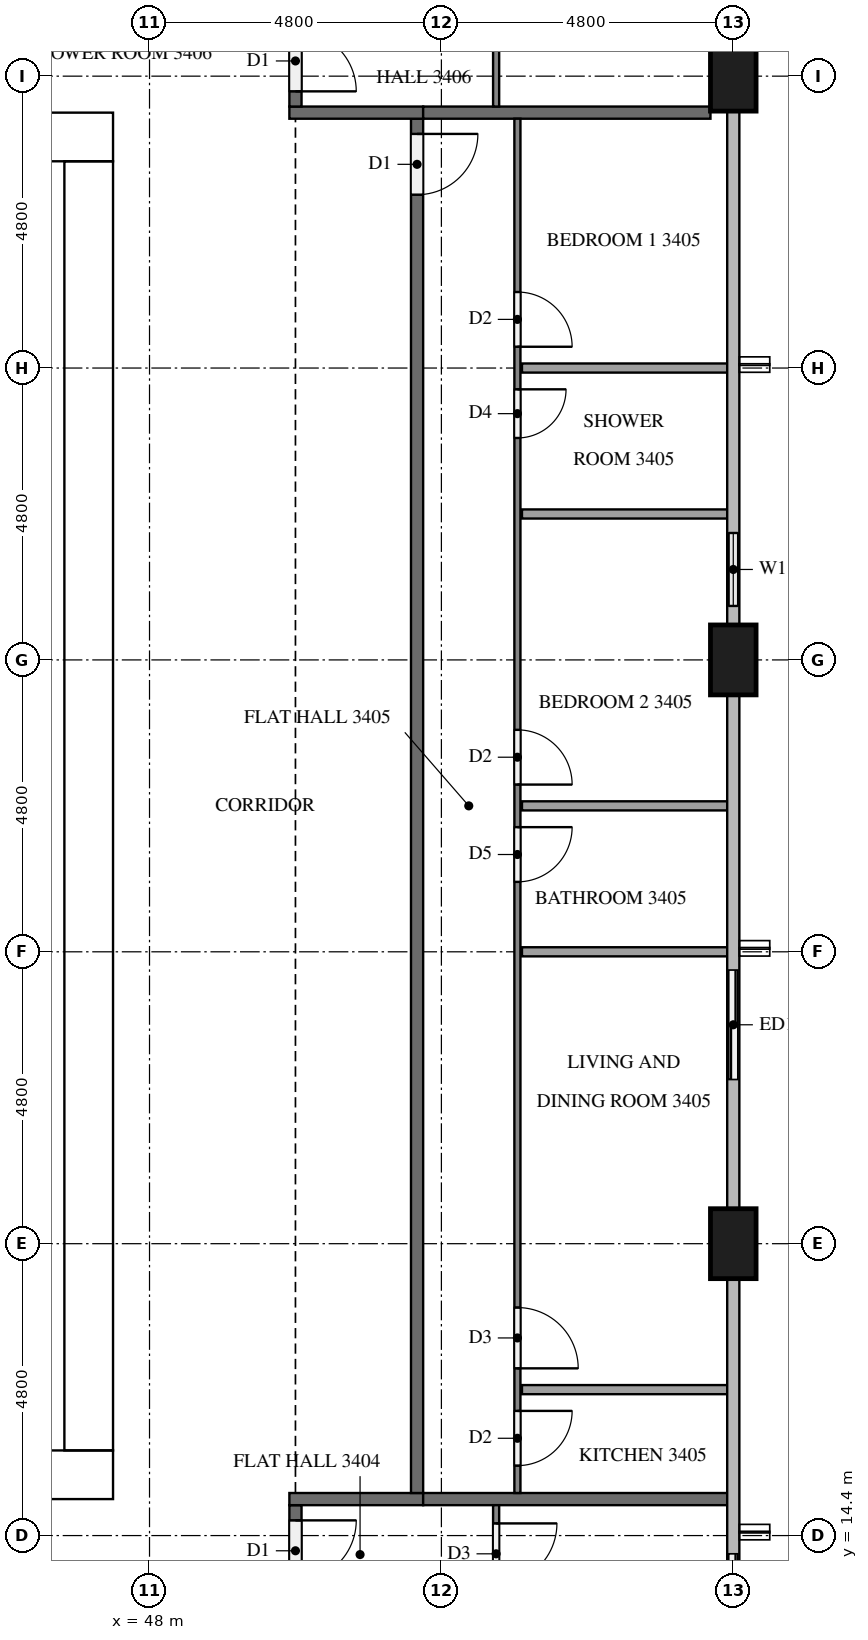
"""IFC4 building model, lengths in metres.
Left out: names, types, materials, properties, quantities, classifications, styles, units other than length and angle.
Written with IfcOpenShell. Run it as: python <this file> out.ifc"""

import sys

from ifc_helpers import new_model, si_unit, direction, frame, frame_2d, origin, origin_2d, place, context, subcontext, project, spatial, rectangle, extrude, element, fill, save


model = new_model("IFC4")
c1 = context("Model", 3, precision=1e-05, world=origin(), true_north=direction((0.0, 1.0)))
c2 = subcontext(c1, "Body", "Model", "MODEL_VIEW")
j1 = project(units=[si_unit("LENGTHUNIT", "METRE"), si_unit("PLANEANGLEUNIT", "RADIAN")], contexts=[c1])
p1 = place(None, origin())
s1 = spatial("IfcSite", under=j1, at=p1, CompositionType="ELEMENT")
p2 = place(p1, origin())
s2 = spatial("IfcBuilding", under=s1, at=p2, CompositionType="ELEMENT")
p3 = place(p2, frame((0.0, 0.0, 133.1)))
s3 = spatial("IfcBuildingStorey", under=s2, at=p3, CompositionType="ELEMENT", Elevation=133.1)
p4 = place(p3, frame((15.0, 15.4, 0.0), z_axis=(0.0, 0.0, 1.0), x_axis=(1.0, 0.0, 0.0)))
e1 = element("IfcWall", 1, at=p4, inside=s3, PredefinedType="SHEAR", context=c2, shape_type="SweptSolid", body=[
    extrude(rectangle(XDim=32.4, YDim=0.8, at=frame_2d((16.2, 0.0))), origin(), (0.0, 0.0, 1.0), 3.2),
])
p5 = place(p4, frame((15.3, 0.0, 0.0)))
e2 = element("IfcOpeningElement", 2, at=p5, cuts=e1, PredefinedType="OPENING", context=c2, shape_type="SweptSolid", body=[
    extrude(rectangle(XDim=1.8, YDim=2.1, at=frame_2d((0.9, 1.05))), frame((0.0, 0.41, 0.0), z_axis=(0.0, -1.0, 0.0), x_axis=(1.0, 0.0, 0.0)), (0.0, 0.0, 1.0), 0.82),
])
p6 = place(p3, frame((15.0, 37.4, 0.0), z_axis=(0.0, 0.0, 1.0), x_axis=(1.0, 0.0, 0.0)))
e3 = element("IfcWall", 3, at=p6, inside=s3, PredefinedType="SHEAR", context=c2, shape_type="SweptSolid", body=[
    extrude(rectangle(XDim=32.4, YDim=0.8, at=frame_2d((16.2, 0.0))), origin(), (0.0, 0.0, 1.0), 3.2),
])
p7 = place(p6, frame((15.3, 0.0, 0.0)))
e4 = element("IfcOpeningElement", 4, at=p7, cuts=e3, PredefinedType="OPENING", context=c2, shape_type="SweptSolid", body=[
    extrude(rectangle(XDim=1.8, YDim=2.1, at=frame_2d((0.9, 1.05))), frame((0.0, 0.41, 0.0), z_axis=(0.0, -1.0, 0.0), x_axis=(1.0, 0.0, 0.0)), (0.0, 0.0, 1.0), 0.82),
])
p8 = place(p6, frame((1.51, 0.0, 0.0)))
e5 = element("IfcOpeningElement", 5, at=p8, cuts=e3, PredefinedType="OPENING", context=c2, shape_type="SweptSolid", body=[
    extrude(rectangle(XDim=1.0, YDim=2.1, at=frame_2d((0.5, 1.05))), frame((0.0, 0.41, 0.0), z_axis=(0.0, -1.0, 0.0), x_axis=(1.0, 0.0, 0.0)), (0.0, 0.0, 1.0), 0.82),
])
p9 = place(p6, frame((5.11, 0.0, 0.0)))
e6 = element("IfcOpeningElement", 6, at=p9, cuts=e3, PredefinedType="OPENING", context=c2, shape_type="SweptSolid", body=[
    extrude(rectangle(XDim=1.0, YDim=2.1, at=frame_2d((0.5, 1.05))), frame((0.0, 0.41, 0.0), z_axis=(0.0, -1.0, 0.0), x_axis=(1.0, 0.0, 0.0)), (0.0, 0.0, 1.0), 0.82),
])
p10 = place(p3, frame((47.0, 15.8, 0.0), z_axis=(0.0, 0.0, 1.0), x_axis=(0.0, 1.0, 0.0)))
e7 = element("IfcWall", 7, at=p10, inside=s3, PredefinedType="SHEAR", context=c2, shape_type="SweptSolid", body=[
    extrude(rectangle(XDim=21.2, YDim=0.8, at=frame_2d((10.6, 0.0))), origin(), (0.0, 0.0, 1.0), 3.2),
])
p11 = place(p10, frame((10.3, 0.0, 0.0)))
e8 = element("IfcOpeningElement", 8, at=p11, cuts=e7, PredefinedType="OPENING", context=c2, shape_type="SweptSolid", body=[
    extrude(rectangle(XDim=1.2, YDim=2.1, at=frame_2d((0.6, 1.05))), frame((0.0, 0.41, 0.0), z_axis=(0.0, -1.0, 0.0), x_axis=(1.0, 0.0, 0.0)), (0.0, 0.0, 1.0), 0.82),
])
for number, where, z_axis, x_axis in (
    (9, (57.6, 19.2, 0.0), (0.0, 0.0, 1.0), (0.0, 1.0, 0.0)),
    (10, (57.6, 28.8, 0.0), (0.0, 0.0, 1.0), (0.0, 1.0, 0.0)),
    (11, (57.6, 38.4, 0.0), (0.0, 0.0, 1.0), (0.0, 1.0, 0.0)),
):
    element("IfcColumn", number, at=place(p3, frame(where, z_axis=z_axis, x_axis=x_axis)), inside=s3, PredefinedType="COLUMN", context=c2, shape_type="SweptSolid", body=[
        extrude(rectangle(XDim=1.15, YDim=0.75, at=origin_2d()), origin(), (0.0, 0.0, 1.0), 3.2),
    ])
p12 = place(p3, frame((57.6, 12.0, 0.0), z_axis=(0.0, 0.0, 1.0), x_axis=(0.0, 1.0, 0.0)))
e12 = element("IfcWall", 12, at=p12, inside=s3, PredefinedType="SOLIDWALL", context=c2, shape_type="SweptSolid", body=[
    extrude(rectangle(XDim=2.4, YDim=0.15, at=frame_2d((1.2, 0.0))), origin(), (0.0, 0.0, 1.0), 3.2),
])
p13 = place(p12, frame((0.3, 0.0, 0.0)))
e13 = element("IfcOpeningElement", 13, at=p13, cuts=e12, PredefinedType="OPENING", context=c2, shape_type="SweptSolid", body=[
    extrude(rectangle(XDim=1.8, YDim=2.4, at=frame_2d((0.9, 1.2))), frame((0.0, 0.085, 0.0), z_axis=(0.0, -1.0, 0.0), x_axis=(1.0, 0.0, 0.0)), (0.0, 0.0, 1.0), 0.17),
])
p14 = place(p3, frame((57.6, 21.6, 0.0), z_axis=(0.0, 0.0, 1.0), x_axis=(0.0, 1.0, 0.0)))
e14 = element("IfcWall", 14, at=p14, inside=s3, PredefinedType="SOLIDWALL", context=c2, shape_type="SweptSolid", body=[
    extrude(rectangle(XDim=2.4, YDim=0.15, at=frame_2d((1.2, 0.0))), origin(), (0.0, 0.0, 1.0), 3.2),
])
p15 = place(p14, frame((0.3, 0.0, 0.0)))
e15 = element("IfcOpeningElement", 15, at=p15, cuts=e14, PredefinedType="OPENING", context=c2, shape_type="SweptSolid", body=[
    extrude(rectangle(XDim=1.8, YDim=2.4, at=frame_2d((0.9, 1.2))), frame((0.0, 0.085, 0.0), z_axis=(0.0, -1.0, 0.0), x_axis=(1.0, 0.0, 0.0)), (0.0, 0.0, 1.0), 0.17),
])
p16 = place(p3, frame((57.6, 29.375, 0.0), z_axis=(0.0, 0.0, 1.0), x_axis=(0.0, 1.0, 0.0)))
e16 = element("IfcWall", 16, at=p16, inside=s3, PredefinedType="SOLIDWALL", context=c2, shape_type="SweptSolid", body=[
    extrude(rectangle(XDim=1.825, YDim=0.15, at=frame_2d((0.913, 0.0))), origin(), (0.0, 0.0, 1.0), 3.2),
])
p17 = place(p16, frame((0.312, 0.0, 0.9)))
e17 = element("IfcOpeningElement", 17, at=p17, cuts=e16, PredefinedType="OPENING", context=c2, shape_type="SweptSolid", body=[
    extrude(rectangle(XDim=1.2, YDim=1.4, at=frame_2d((0.6, 0.7))), frame((0.0, 0.085, 0.0), z_axis=(0.0, -1.0, 0.0), x_axis=(1.0, 0.0, 0.0)), (0.0, 0.0, 1.0), 0.17),
])
p18 = place(p3, frame((50.4, 14.9, 0.0), z_axis=(0.0, 0.0, 1.0), x_axis=(0.0, -1.0, 0.0)))
e18 = element("IfcWall", 18, at=p18, inside=s3, PredefinedType="PARTITIONING", context=c2, shape_type="SweptSolid", body=[
    extrude(rectangle(XDim=2.8, YDim=0.2, at=frame_2d((1.4, 0.0))), origin(), (0.0, 0.0, 1.0), 3.2),
])
p19 = place(p18, frame((0.25, 0.0, 0.0)))
e19 = element("IfcOpeningElement", 19, at=p19, cuts=e18, PredefinedType="OPENING", context=c2, shape_type="SweptSolid", body=[
    extrude(rectangle(XDim=1.0, YDim=2.1, at=frame_2d((0.5, 1.05))), frame((0.0, 0.11, 0.0), z_axis=(0.0, -1.0, 0.0), x_axis=(1.0, 0.0, 0.0)), (0.0, 0.0, 1.0), 0.22),
])
p20 = place(p3, frame((50.3, 15.0, 0.0), z_axis=(0.0, 0.0, 1.0), x_axis=(1.0, 0.0, 0.0)))
e20 = element("IfcWall", 20, at=p20, inside=s3, PredefinedType="PARTITIONING", context=c2, shape_type="SweptSolid", body=[
    extrude(rectangle(XDim=2.2, YDim=0.2, at=frame_2d((1.1, 0.0))), origin(), (0.0, 0.0, 1.0), 3.2),
])
p21 = place(p3, frame((52.4, 37.7, 0.0), z_axis=(0.0, 0.0, 1.0), x_axis=(0.0, -1.0, 0.0)))
e21 = element("IfcWall", 21, at=p21, inside=s3, PredefinedType="PARTITIONING", context=c2, shape_type="SweptSolid", body=[
    extrude(rectangle(XDim=22.6, YDim=0.2, at=frame_2d((11.3, 0.0))), origin(), (0.0, 0.0, 1.0), 3.2),
])
p22 = place(p21, frame((0.25, 0.0, 0.0)))
e22 = element("IfcOpeningElement", 22, at=p22, cuts=e21, PredefinedType="OPENING", context=c2, shape_type="SweptSolid", body=[
    extrude(rectangle(XDim=1.0, YDim=2.1, at=frame_2d((0.5, 1.05))), frame((0.0, 0.11, 0.0), z_axis=(0.0, -1.0, 0.0), x_axis=(1.0, 0.0, 0.0)), (0.0, 0.0, 1.0), 0.22),
])
p23 = place(p3, frame((52.5, 37.8, 0.0), z_axis=(0.0, 0.0, 1.0), x_axis=(-1.0, 0.0, 0.0)))
e23 = element("IfcWall", 23, at=p23, inside=s3, PredefinedType="PARTITIONING", context=c2, shape_type="SweptSolid", body=[
    extrude(rectangle(XDim=2.2, YDim=0.2, at=frame_2d((1.1, 0.0))), origin(), (0.0, 0.0, 1.0), 3.2),
])
p24 = place(p3, frame((50.4, 40.7, 0.0), z_axis=(0.0, 0.0, 1.0), x_axis=(0.0, -1.0, 0.0)))
e24 = element("IfcWall", 24, at=p24, inside=s3, PredefinedType="PARTITIONING", context=c2, shape_type="SweptSolid", body=[
    extrude(rectangle(XDim=2.8, YDim=0.2, at=frame_2d((1.4, 0.0))), origin(), (0.0, 0.0, 1.0), 3.2),
])
p25 = place(p24, frame((1.55, 0.0, 0.0)))
e25 = element("IfcOpeningElement", 25, at=p25, cuts=e24, PredefinedType="OPENING", context=c2, shape_type="SweptSolid", body=[
    extrude(rectangle(XDim=1.0, YDim=2.1, at=frame_2d((0.5, 1.05))), frame((0.0, 0.11, 0.0), z_axis=(0.0, -1.0, 0.0), x_axis=(1.0, 0.0, 0.0)), (0.0, 0.0, 1.0), 0.22),
])
p26 = place(p3, frame((52.5, 15.0, 0.0), z_axis=(0.0, 0.0, 1.0), x_axis=(1.0, 0.0, 0.0)))
e26 = element("IfcWall", 26, at=p26, inside=s3, PredefinedType="PARTITIONING", context=c2, shape_type="SweptSolid", body=[
    extrude(rectangle(XDim=5.0, YDim=0.2, at=frame_2d((2.5, 0.0))), origin(), (0.0, 0.0, 1.0), 3.2),
])
p27 = place(p3, frame((52.5, 37.8, 0.0), z_axis=(0.0, 0.0, 1.0), x_axis=(1.0, 0.0, 0.0)))
e27 = element("IfcWall", 27, at=p27, inside=s3, PredefinedType="PARTITIONING", context=c2, shape_type="SweptSolid", body=[
    extrude(rectangle(XDim=4.725, YDim=0.2, at=frame_2d((2.363, 0.0))), origin(), (0.0, 0.0, 1.0), 3.2),
])
p28 = place(p3, frame((53.7, 14.9, 0.0), z_axis=(0.0, 0.0, 1.0), x_axis=(0.0, -1.0, 0.0)))
e28 = element("IfcWall", 28, at=p28, inside=s3, PredefinedType="PARTITIONING", context=c2, shape_type="SweptSolid", body=[
    extrude(rectangle(XDim=9.759, YDim=0.1, at=frame_2d((4.879, 0.0))), origin(), (0.0, 0.0, 1.0), 3.2),
])
p29 = place(p28, frame((0.3, 0.0, 0.0)))
e29 = element("IfcOpeningElement", 29, at=p29, cuts=e28, PredefinedType="OPENING", context=c2, shape_type="SweptSolid", body=[
    extrude(rectangle(XDim=1.0, YDim=2.1, at=frame_2d((0.5, 1.05))), frame((0.0, 0.06, 0.0), z_axis=(0.0, -1.0, 0.0), x_axis=(1.0, 0.0, 0.0)), (0.0, 0.0, 1.0), 0.12),
])
p30 = place(p28, frame((8.559, 0.0, 0.0)))
e30 = element("IfcOpeningElement", 30, at=p30, cuts=e28, PredefinedType="OPENING", context=c2, shape_type="SweptSolid", body=[
    extrude(rectangle(XDim=0.9, YDim=2.1, at=frame_2d((0.45, 1.05))), frame((0.0, 0.06, 0.0), z_axis=(0.0, -1.0, 0.0), x_axis=(1.0, 0.0, 0.0)), (0.0, 0.0, 1.0), 0.12),
])
for number, where, z_axis, x_axis in (
    (31, (54.125, 33.6, 0.0), (0.0, 0.0, 1.0), (1.0, 0.0, 0.0)),
    (32, (54.125, 31.2, 0.0), (0.0, 0.0, 1.0), (1.0, 0.0, 0.0)),
    (33, (54.125, 26.4, 0.0), (0.0, 0.0, 1.0), (1.0, 0.0, 0.0)),
    (34, (54.125, 24.0, 0.0), (0.0, 0.0, 1.0), (1.0, 0.0, 0.0)),
    (35, (54.125, 16.8, 0.0), (0.0, 0.0, 1.0), (1.0, 0.0, 0.0)),
):
    element("IfcWall", number, at=place(p3, frame(where, z_axis=z_axis, x_axis=x_axis)), inside=s3, PredefinedType="PARTITIONING", context=c2, shape_type="SweptSolid", body=[
        extrude(rectangle(XDim=3.375, YDim=0.15, at=frame_2d((1.688, 0.0))), origin(), (0.0, 0.0, 1.0), 3.2),
    ])
p31 = place(p3, frame((54.05, 37.7, 0.0), z_axis=(0.0, 0.0, 1.0), x_axis=(0.0, -1.0, 0.0)))
e36 = element("IfcWall", 36, at=p31, inside=s3, PredefinedType="PARTITIONING", context=c2, shape_type="SweptSolid", body=[
    extrude(rectangle(XDim=22.6, YDim=0.1, at=frame_2d((11.3, 0.0))), origin(), (0.0, 0.0, 1.0), 3.2),
])
p32 = place(p31, frame((2.85, 0.0, 0.0)))
e37 = element("IfcOpeningElement", 37, at=p32, cuts=e36, PredefinedType="OPENING", context=c2, shape_type="SweptSolid", body=[
    extrude(rectangle(XDim=0.9, YDim=2.1, at=frame_2d((0.45, 1.05))), frame((0.0, 0.06, 0.0), z_axis=(0.0, -1.0, 0.0), x_axis=(1.0, 0.0, 0.0)), (0.0, 0.0, 1.0), 0.12),
])
p33 = place(p31, frame((4.45, 0.0, 0.0)))
e38 = element("IfcOpeningElement", 38, at=p33, cuts=e36, PredefinedType="OPENING", context=c2, shape_type="SweptSolid", body=[
    extrude(rectangle(XDim=0.8, YDim=2.1, at=frame_2d((0.4, 1.05))), frame((0.0, 0.06, 0.0), z_axis=(0.0, -1.0, 0.0), x_axis=(1.0, 0.0, 0.0)), (0.0, 0.0, 1.0), 0.12),
])
p34 = place(p31, frame((10.05, 0.0, 0.0)))
e39 = element("IfcOpeningElement", 39, at=p34, cuts=e36, PredefinedType="OPENING", context=c2, shape_type="SweptSolid", body=[
    extrude(rectangle(XDim=0.9, YDim=2.1, at=frame_2d((0.45, 1.05))), frame((0.0, 0.06, 0.0), z_axis=(0.0, -1.0, 0.0), x_axis=(1.0, 0.0, 0.0)), (0.0, 0.0, 1.0), 0.12),
])
p35 = place(p31, frame((11.65, 0.0, 0.0)))
e40 = element("IfcOpeningElement", 40, at=p35, cuts=e36, PredefinedType="OPENING", context=c2, shape_type="SweptSolid", body=[
    extrude(rectangle(XDim=0.9, YDim=2.1, at=frame_2d((0.45, 1.05))), frame((0.0, 0.06, 0.0), z_axis=(0.0, -1.0, 0.0), x_axis=(1.0, 0.0, 0.0)), (0.0, 0.0, 1.0), 0.12),
])
p36 = place(p31, frame((19.55, 0.0, 0.0)))
e41 = element("IfcOpeningElement", 41, at=p36, cuts=e36, PredefinedType="OPENING", context=c2, shape_type="SweptSolid", body=[
    extrude(rectangle(XDim=1.0, YDim=2.1, at=frame_2d((0.5, 1.05))), frame((0.0, 0.06, 0.0), z_axis=(0.0, -1.0, 0.0), x_axis=(1.0, 0.0, 0.0)), (0.0, 0.0, 1.0), 0.12),
])
p37 = place(p31, frame((21.25, 0.0, 0.0)))
e42 = element("IfcOpeningElement", 42, at=p37, cuts=e36, PredefinedType="OPENING", context=c2, shape_type="SweptSolid", body=[
    extrude(rectangle(XDim=0.9, YDim=2.1, at=frame_2d((0.45, 1.05))), frame((0.0, 0.06, 0.0), z_axis=(0.0, -1.0, 0.0), x_axis=(1.0, 0.0, 0.0)), (0.0, 0.0, 1.0), 0.12),
])
p38 = place(p3, frame((53.7, 52.459, 0.0), z_axis=(0.0, 0.0, 1.0), x_axis=(0.0, -1.0, 0.0)))
e43 = element("IfcWall", 43, at=p38, inside=s3, PredefinedType="PARTITIONING", context=c2, shape_type="SweptSolid", body=[
    extrude(rectangle(XDim=14.559, YDim=0.1, at=frame_2d((7.279, 0.0))), origin(), (0.0, 0.0, 1.0), 3.2),
])
p39 = place(p38, frame((9.609, 0.0, 0.0)))
e44 = element("IfcOpeningElement", 44, at=p39, cuts=e43, PredefinedType="OPENING", context=c2, shape_type="SweptSolid", body=[
    extrude(rectangle(XDim=0.9, YDim=2.1, at=frame_2d((0.45, 1.05))), frame((0.0, 0.06, 0.0), z_axis=(0.0, -1.0, 0.0), x_axis=(1.0, 0.0, 0.0)), (0.0, 0.0, 1.0), 0.12),
])
p40 = place(p38, frame((7.909, 0.0, 0.0)))
e45 = element("IfcOpeningElement", 45, at=p40, cuts=e43, PredefinedType="OPENING", context=c2, shape_type="SweptSolid", body=[
    extrude(rectangle(XDim=1.0, YDim=2.1, at=frame_2d((0.5, 1.05))), frame((0.0, 0.06, 0.0), z_axis=(0.0, -1.0, 0.0), x_axis=(1.0, 0.0, 0.0)), (0.0, 0.0, 1.0), 0.12),
])
p41 = place(p38, frame((0.3, 0.0, 0.0)))
e46 = element("IfcOpeningElement", 46, at=p41, cuts=e43, PredefinedType="OPENING", context=c2, shape_type="SweptSolid", body=[
    extrude(rectangle(XDim=0.9, YDim=2.1, at=frame_2d((0.45, 1.05))), frame((0.0, 0.06, 0.0), z_axis=(0.0, -1.0, 0.0), x_axis=(1.0, 0.0, 0.0)), (0.0, 0.0, 1.0), 0.12),
])
p42 = place(p13, origin())
e47 = element("IfcDoor", 47, at=p42, inside=s3, OperationType="SLIDING_TO_RIGHT", PredefinedType="DOOR", context=c2, shape_type="SweptSolid", body=[
    extrude(rectangle(XDim=1.8, YDim=2.4, at=frame_2d((0.9, 1.2))), frame((0.0, 0.025, 0.0), z_axis=(0.0, -1.0, 0.0), x_axis=(1.0, 0.0, 0.0)), (0.0, 0.0, 1.0), 0.05),
])
fill(e13, e47)
p43 = place(p15, origin())
e48 = element("IfcDoor", 48, at=p43, inside=s3, OperationType="SLIDING_TO_LEFT", PredefinedType="DOOR", context=c2, shape_type="SweptSolid", body=[
    extrude(rectangle(XDim=1.8, YDim=2.4, at=frame_2d((0.9, 1.2))), frame((0.0, 0.025, 0.0), z_axis=(0.0, -1.0, 0.0), x_axis=(1.0, 0.0, 0.0)), (0.0, 0.0, 1.0), 0.05),
])
fill(e15, e48)
p44 = place(p17, origin())
e49 = element("IfcWindow", 49, at=p44, inside=s3, PartitioningType="SINGLE_PANEL", PredefinedType="WINDOW", context=c2, shape_type="SweptSolid", body=[
    extrude(rectangle(XDim=1.2, YDim=1.4, at=frame_2d((0.6, 0.7))), frame((0.0, 0.03, 0.0), z_axis=(0.0, -1.0, 0.0), x_axis=(1.0, 0.0, 0.0)), (0.0, 0.0, 1.0), 0.06),
])
fill(e17, e49)
p45 = place(p11, origin())
e50 = element("IfcDoor", 50, at=p45, inside=s3, OperationType="SINGLE_SWING_RIGHT", PredefinedType="DOOR", context=c2, shape_type="SweptSolid", body=[
    extrude(rectangle(XDim=1.2, YDim=2.1, at=frame_2d((0.6, 1.05))), frame((0.0, 0.025, 0.0), z_axis=(0.0, -1.0, 0.0), x_axis=(1.0, 0.0, 0.0)), (0.0, 0.0, 1.0), 0.05),
])
fill(e8, e50)
p46 = place(p19, origin())
e51 = element("IfcDoor", 51, at=p46, inside=s3, OperationType="SINGLE_SWING_LEFT", PredefinedType="DOOR", context=c2, shape_type="SweptSolid", body=[
    extrude(rectangle(XDim=1.0, YDim=2.1, at=frame_2d((0.5, 1.05))), frame((0.0, 0.025, 0.0), z_axis=(0.0, -1.0, 0.0), x_axis=(1.0, 0.0, 0.0)), (0.0, 0.0, 1.0), 0.05),
])
fill(e19, e51)
p47 = place(p22, origin())
e52 = element("IfcDoor", 52, at=p47, inside=s3, OperationType="SINGLE_SWING_LEFT", PredefinedType="DOOR", context=c2, shape_type="SweptSolid", body=[
    extrude(rectangle(XDim=1.0, YDim=2.1, at=frame_2d((0.5, 1.05))), frame((0.0, 0.025, 0.0), z_axis=(0.0, -1.0, 0.0), x_axis=(1.0, 0.0, 0.0)), (0.0, 0.0, 1.0), 0.05),
])
fill(e22, e52)
p48 = place(p25, origin())
e53 = element("IfcDoor", 53, at=p48, inside=s3, OperationType="SINGLE_SWING_RIGHT", PredefinedType="DOOR", context=c2, shape_type="SweptSolid", body=[
    extrude(rectangle(XDim=1.0, YDim=2.1, at=frame_2d((0.5, 1.05))), frame((0.0, 0.025, 0.0), z_axis=(0.0, -1.0, 0.0), x_axis=(1.0, 0.0, 0.0)), (0.0, 0.0, 1.0), 0.05),
])
fill(e25, e53)
p49 = place(p29, origin())
e54 = element("IfcDoor", 54, at=p49, inside=s3, OperationType="SINGLE_SWING_LEFT", PredefinedType="DOOR", context=c2, shape_type="SweptSolid", body=[
    extrude(rectangle(XDim=1.0, YDim=2.1, at=frame_2d((0.5, 1.05))), frame((0.0, 0.025, 0.0), z_axis=(0.0, -1.0, 0.0), x_axis=(1.0, 0.0, 0.0)), (0.0, 0.0, 1.0), 0.05),
])
fill(e29, e54)
p50 = place(p32, origin())
e55 = element("IfcDoor", 55, at=p50, inside=s3, OperationType="SINGLE_SWING_RIGHT", PredefinedType="DOOR", context=c2, shape_type="SweptSolid", body=[
    extrude(rectangle(XDim=0.9, YDim=2.1, at=frame_2d((0.45, 1.05))), frame((0.0, 0.025, 0.0), z_axis=(0.0, -1.0, 0.0), x_axis=(1.0, 0.0, 0.0)), (0.0, 0.0, 1.0), 0.05),
])
fill(e37, e55)
p51 = place(p33, origin())
e56 = element("IfcDoor", 56, at=p51, inside=s3, OperationType="SINGLE_SWING_LEFT", PredefinedType="DOOR", context=c2, shape_type="SweptSolid", body=[
    extrude(rectangle(XDim=0.8, YDim=2.1, at=frame_2d((0.4, 1.05))), frame((0.0, 0.025, 0.0), z_axis=(0.0, -1.0, 0.0), x_axis=(1.0, 0.0, 0.0)), (0.0, 0.0, 1.0), 0.05),
])
fill(e38, e56)
p52 = place(p34, origin())
e57 = element("IfcDoor", 57, at=p52, inside=s3, OperationType="SINGLE_SWING_RIGHT", PredefinedType="DOOR", context=c2, shape_type="SweptSolid", body=[
    extrude(rectangle(XDim=0.9, YDim=2.1, at=frame_2d((0.45, 1.05))), frame((0.0, 0.025, 0.0), z_axis=(0.0, -1.0, 0.0), x_axis=(1.0, 0.0, 0.0)), (0.0, 0.0, 1.0), 0.05),
])
fill(e39, e57)
p53 = place(p35, origin())
e58 = element("IfcDoor", 58, at=p53, inside=s3, OperationType="SINGLE_SWING_LEFT", PredefinedType="DOOR", context=c2, shape_type="SweptSolid", body=[
    extrude(rectangle(XDim=0.9, YDim=2.1, at=frame_2d((0.45, 1.05))), frame((0.0, 0.025, 0.0), z_axis=(0.0, -1.0, 0.0), x_axis=(1.0, 0.0, 0.0)), (0.0, 0.0, 1.0), 0.05),
])
fill(e40, e58)
p54 = place(p36, origin())
e59 = element("IfcDoor", 59, at=p54, inside=s3, OperationType="SINGLE_SWING_RIGHT", PredefinedType="DOOR", context=c2, shape_type="SweptSolid", body=[
    extrude(rectangle(XDim=1.0, YDim=2.1, at=frame_2d((0.5, 1.05))), frame((0.0, 0.025, 0.0), z_axis=(0.0, -1.0, 0.0), x_axis=(1.0, 0.0, 0.0)), (0.0, 0.0, 1.0), 0.05),
])
fill(e41, e59)
p55 = place(p37, origin())
e60 = element("IfcDoor", 60, at=p55, inside=s3, OperationType="SINGLE_SWING_LEFT", PredefinedType="DOOR", context=c2, shape_type="SweptSolid", body=[
    extrude(rectangle(XDim=0.9, YDim=2.1, at=frame_2d((0.45, 1.05))), frame((0.0, 0.025, 0.0), z_axis=(0.0, -1.0, 0.0), x_axis=(1.0, 0.0, 0.0)), (0.0, 0.0, 1.0), 0.05),
])
fill(e42, e60)
save(model, sys.argv[1])
